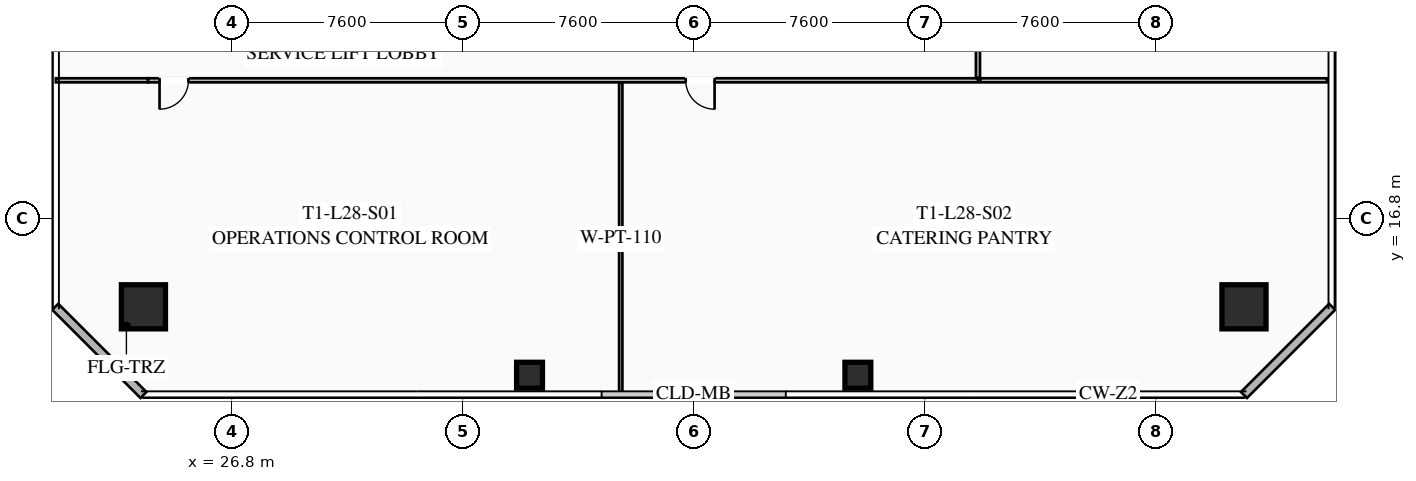
"""IFC4 building model, lengths in metres.
Left out: names, types, materials, properties, quantities, classifications, styles, units other than length and angle.
Written with IfcOpenShell. Run it as: python <this file> out.ifc"""

import sys

from ifc_helpers import new_model, si_unit, direction, frame, frame_2d, origin, origin_2d, place, context, subcontext, project, spatial, rectangle, hollow_rectangle, extrude, element, fill, save


model = new_model("IFC4")
c1 = context("Model", 3, precision=1e-05, world=origin(), true_north=direction((0.0, 1.0)))
c2 = subcontext(c1, "Body", "Model", "MODEL_VIEW")
j1 = project(units=[si_unit("LENGTHUNIT", "METRE"), si_unit("PLANEANGLEUNIT", "RADIAN")], contexts=[c1])
p1 = place(None, origin())
s1 = spatial("IfcSite", under=j1, at=p1, CompositionType="ELEMENT")
p2 = place(p1, origin())
s2 = spatial("IfcBuilding", under=s1, at=p2, CompositionType="ELEMENT")
p3 = place(p2, frame((0.0, 0.0, 106.25)))
s3 = spatial("IfcBuildingStorey", under=s2, at=p3, CompositionType="ELEMENT", Elevation=106.25)
for number, where, z_axis, x_axis in (
    (1, (23.9, 13.9, 0.0), (0.0, 0.0, 1.0), (1.0, 0.0, 0.0)),
    (2, (60.1, 13.9, 0.0), (0.0, 0.0, 1.0), (1.0, 0.0, 0.0)),
):
    element("IfcColumn", number, at=place(p3, frame(where, z_axis=z_axis, x_axis=x_axis)), inside=s3, PredefinedType="COLUMN", context=c2, shape_type="SweptSolid", body=[
        extrude(hollow_rectangle(XDim=1.45, YDim=1.45, WallThickness=0.055, at=origin_2d()), origin(), (0.0, 0.0, 1.0), 3.25),
    ])
for number, where, z_axis, x_axis in (
    (3, (36.6, 11.65, 0.0), (0.0, 0.0, 1.0), (1.0, 0.0, 0.0)),
    (4, (47.4, 11.65, 0.0), (0.0, 0.0, 1.0), (1.0, 0.0, 0.0)),
):
    element("IfcColumn", number, at=place(p3, frame(where, z_axis=z_axis, x_axis=x_axis)), inside=s3, PredefinedType="COLUMN", context=c2, shape_type="SweptSolid", body=[
        extrude(hollow_rectangle(XDim=0.85, YDim=0.85, WallThickness=0.035, at=origin_2d()), origin(), (0.0, 0.0, 1.0), 3.25),
    ])
for number, where, z_axis, x_axis in (
    (5, (23.9, 11.0, 0.0), (0.0, 0.0, 1.0), (-0.707, 0.707, 0.0)),
    (6, (63.0, 13.9, 0.0), (0.0, 0.0, 1.0), (-0.707, -0.707, 0.0)),
):
    element("IfcWall", number, at=place(p3, frame(where, z_axis=z_axis, x_axis=x_axis)), inside=s3, PredefinedType="SOLIDWALL", context=c2, shape_type="SweptSolid", body=[
        extrude(rectangle(XDim=4.101, YDim=0.28, at=frame_2d((2.051, 0.0))), origin(), (0.0, 0.0, 1.0), 3.25),
    ])
p4 = place(p3, frame((51.35, 21.35, 0.0), z_axis=(0.0, 0.0, 1.0), x_axis=(-1.0, 0.0, 0.0)))
e7 = element("IfcWall", 7, at=p4, inside=s3, PredefinedType="PARTITIONING", context=c2, shape_type="SweptSolid", body=[
    extrude(rectangle(XDim=27.3, YDim=0.135, at=frame_2d((13.65, 0.0))), origin(), (0.0, 0.0, 1.0), 2.393),
])
p5 = place(p4, frame((25.97, 0.0, 0.0)))
e8 = element("IfcOpeningElement", 8, at=p5, cuts=e7, PredefinedType="OPENING", context=c2, shape_type="SweptSolid", body=[
    extrude(rectangle(XDim=0.95, YDim=2.05, at=frame_2d((0.475, 1.025))), frame((0.0, 0.077, 0.0), z_axis=(0.0, -1.0, 0.0), x_axis=(1.0, 0.0, 0.0)), (0.0, 0.0, 1.0), 0.155),
])
p6 = place(p4, frame((8.663, 0.0, 0.0)))
e9 = element("IfcOpeningElement", 9, at=p6, cuts=e7, PredefinedType="OPENING", context=c2, shape_type="SweptSolid", body=[
    extrude(rectangle(XDim=0.95, YDim=2.05, at=frame_2d((0.475, 1.025))), frame((0.0, 0.077, 0.0), z_axis=(0.0, -1.0, 0.0), x_axis=(1.0, 0.0, 0.0)), (0.0, 0.0, 1.0), 0.155),
])
p7 = place(p3, frame((21.02, 21.35, 0.0), z_axis=(0.0, 0.0, 1.0), x_axis=(1.0, 0.0, 0.0)))
e10 = element("IfcWall", 10, at=p7, inside=s3, PredefinedType="PARTITIONING", context=c2, shape_type="SweptSolid", body=[
    extrude(rectangle(XDim=3.03, YDim=0.135, at=frame_2d((1.515, 0.0))), origin(), (0.0, 0.0, 1.0), 2.393),
])
p8 = place(p3, frame((39.6, 11.02, 0.0), z_axis=(0.0, 0.0, 1.0), x_axis=(0.0, 1.0, 0.0)))
e11 = element("IfcWall", 11, at=p8, inside=s3, PredefinedType="PARTITIONING", context=c2, shape_type="SweptSolid", body=[
    extrude(rectangle(XDim=10.25, YDim=0.11, at=frame_2d((5.125, 0.0))), origin(), (0.0, 0.0, 1.0), 2.393),
])
p9 = place(p3, frame((51.35, 43.39, 0.0), z_axis=(0.0, 0.0, 1.0), x_axis=(0.0, -1.0, 0.0)))
e12 = element("IfcWall", 12, at=p9, inside=s3, PredefinedType="PARTITIONING", context=c2, shape_type="SweptSolid", body=[
    extrude(rectangle(XDim=21.96, YDim=0.135, at=frame_2d((10.98, 0.0))), origin(), (0.0, 0.0, 1.0), 2.393),
])
p10 = place(p9, frame((10.631, 0.0, 0.0)))
e13 = element("IfcOpeningElement", 13, at=p10, cuts=e12, PredefinedType="OPENING", context=c2, shape_type="SweptSolid", body=[
    extrude(rectangle(XDim=0.95, YDim=2.05, at=frame_2d((0.475, 1.025))), frame((0.0, 0.077, 0.0), z_axis=(0.0, -1.0, 0.0), x_axis=(1.0, 0.0, 0.0)), (0.0, 0.0, 1.0), 0.155),
])
p11 = place(p3, frame((51.43, 21.35, 0.0), z_axis=(0.0, 0.0, 1.0), x_axis=(1.0, 0.0, 0.0)))
e14 = element("IfcWall", 14, at=p11, inside=s3, PredefinedType="PARTITIONING", context=c2, shape_type="SweptSolid", body=[
    extrude(rectangle(XDim=11.4, YDim=0.135, at=frame_2d((5.7, 0.0))), origin(), (0.0, 0.0, 1.0), 2.393),
])
p12 = place(p5, origin())
e15 = element("IfcDoor", 15, at=p12, inside=s3, OperationType="SINGLE_SWING_RIGHT", PredefinedType="DOOR", context=c2, shape_type="SweptSolid", body=[
    extrude(rectangle(XDim=0.95, YDim=2.05, at=frame_2d((0.475, 1.025))), frame((0.0, 0.025, 0.0), z_axis=(0.0, -1.0, 0.0), x_axis=(1.0, 0.0, 0.0)), (0.0, 0.0, 1.0), 0.05),
])
fill(e8, e15)
p13 = place(p6, origin())
e16 = element("IfcDoor", 16, at=p13, inside=s3, OperationType="SINGLE_SWING_LEFT", PredefinedType="DOOR", context=c2, shape_type="SweptSolid", body=[
    extrude(rectangle(XDim=0.95, YDim=2.05, at=frame_2d((0.475, 1.025))), frame((0.0, 0.025, 0.0), z_axis=(0.0, -1.0, 0.0), x_axis=(1.0, 0.0, 0.0)), (0.0, 0.0, 1.0), 0.05),
])
fill(e9, e16)
save(model, sys.argv[1])
